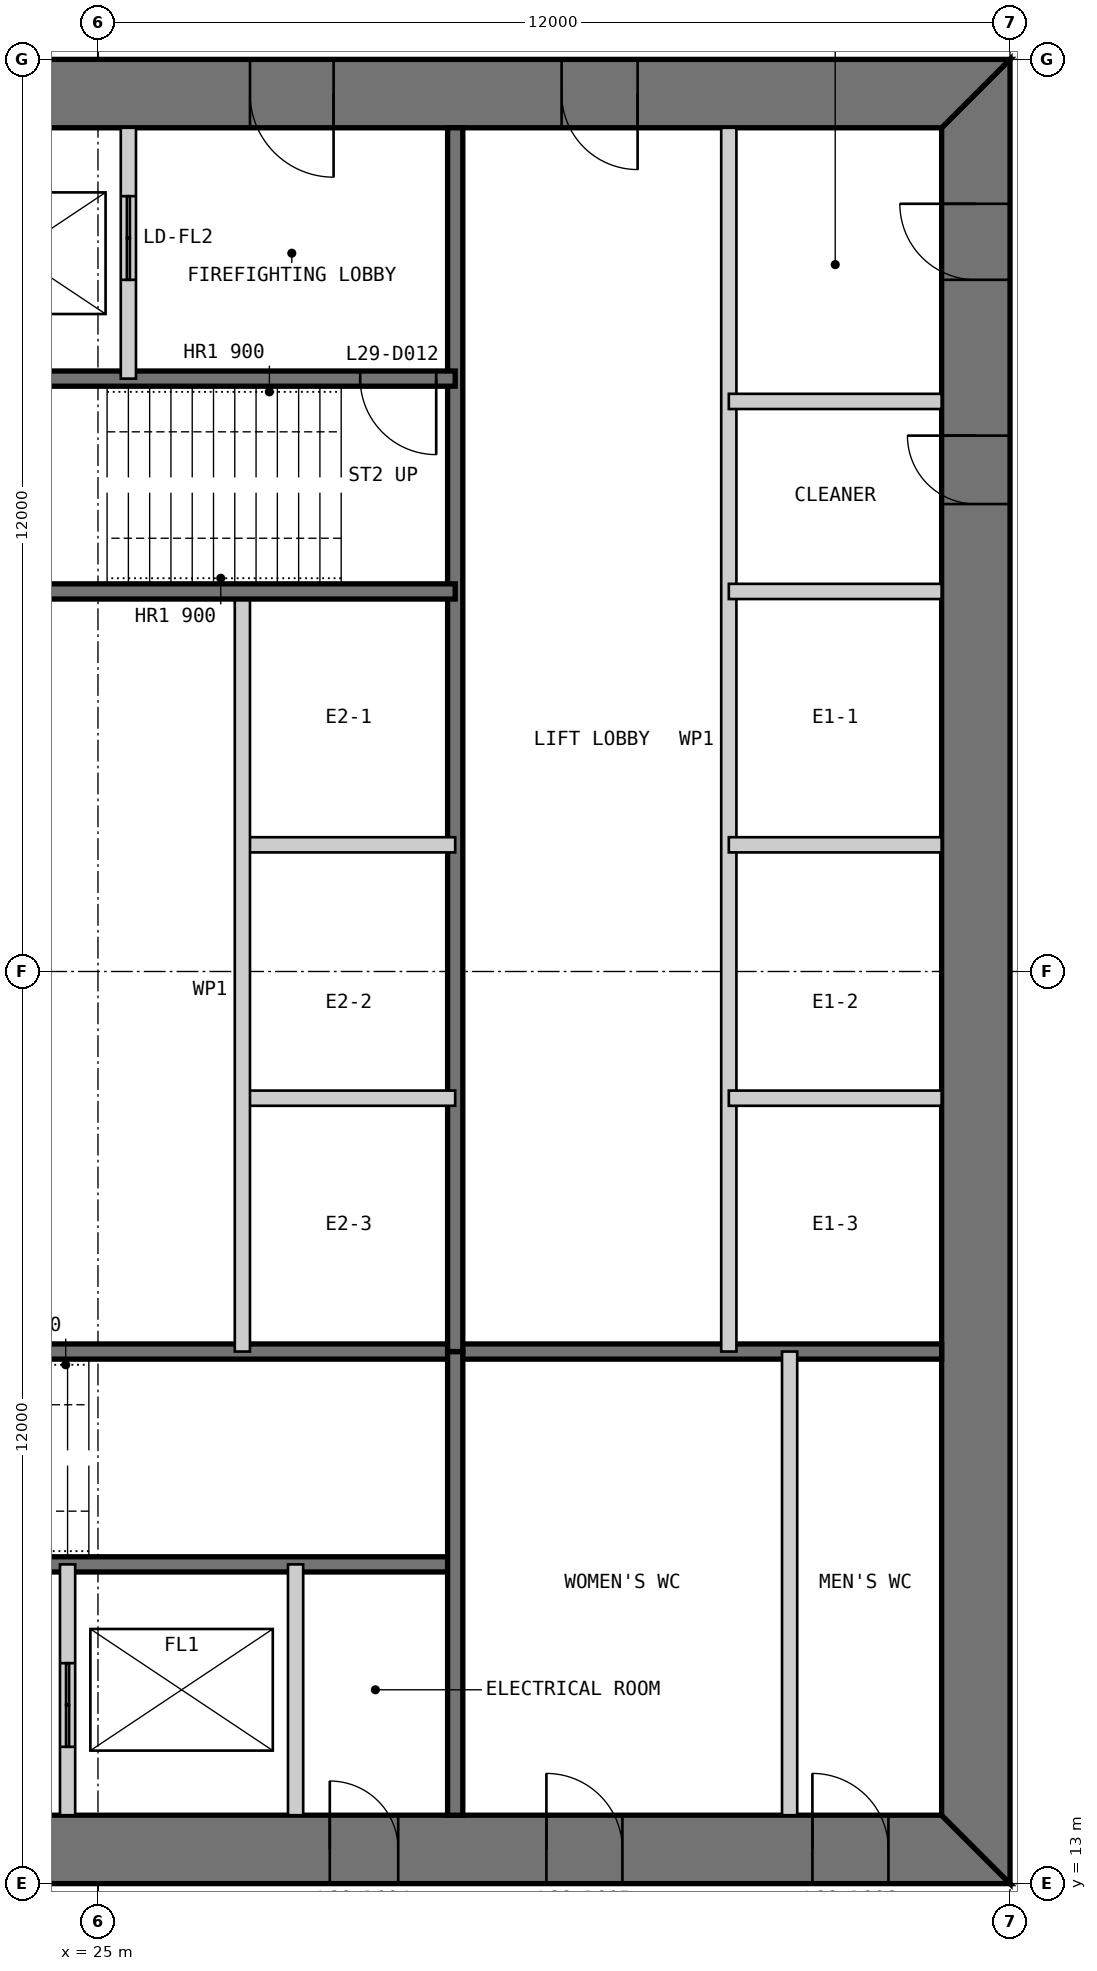
"""IFC4 building model, lengths in metres.
Left out: names, types, materials, properties, quantities, classifications, styles, units other than length and angle.
Written with IfcOpenShell. Run it as: python <this file> out.ifc"""

import sys

from ifc_helpers import new_model, si_unit, direction, frame, frame_2d, origin, place, context, subcontext, project, spatial, polyline, rectangle, outline, extrude, element, fill, save


model = new_model("IFC4")
c1 = context("Model", 3, precision=1e-05, world=origin(), true_north=direction((0.0, 1.0)))
c2 = subcontext(c1, "Body", "Model", "MODEL_VIEW")
j1 = project(units=[si_unit("LENGTHUNIT", "METRE"), si_unit("PLANEANGLEUNIT", "RADIAN")], contexts=[c1])
p1 = place(None, origin())
s1 = spatial("IfcSite", under=j1, at=p1, CompositionType="ELEMENT")
p2 = place(p1, origin())
s2 = spatial("IfcBuilding", under=s1, at=p2, CompositionType="ELEMENT")
p3 = place(p2, frame((0.0, 0.0, 126.4)))
s3 = spatial("IfcBuildingStorey", under=s2, at=p3, CompositionType="ELEMENT", Elevation=126.4)
p4 = place(p3, frame((13.0, 13.45, 0.0), z_axis=(0.0, 0.0, 1.0), x_axis=(1.0, 0.0, 0.0)))
e1 = element("IfcWall", 1, at=p4, inside=s3, PredefinedType="SHEAR", context=c2, shape_type="SweptSolid", body=[
    extrude(outline(polyline([(0.0, -0.45), (24.0, -0.45), (23.1, 0.45), (0.9, 0.45), (0.0, -0.45)])), origin(), (0.0, 0.0, 1.0), 4.0),
])
p5 = place(p4, frame((4.9, 0.0, 0.0)))
e2 = element("IfcOpeningElement", 2, at=p5, cuts=e1, PredefinedType="OPENING", context=c2, shape_type="SweptSolid", body=[
    extrude(rectangle(XDim=1.0, YDim=2.2, at=frame_2d((0.5, 1.1))), frame((0.0, 0.46, 0.0), z_axis=(0.0, -1.0, 0.0), x_axis=(1.0, 0.0, 0.0)), (0.0, 0.0, 1.0), 0.92),
])
p6 = place(p4, frame((8.9, 0.0, 0.0)))
e3 = element("IfcOpeningElement", 3, at=p6, cuts=e1, PredefinedType="OPENING", context=c2, shape_type="SweptSolid", body=[
    extrude(rectangle(XDim=1.1, YDim=2.2, at=frame_2d((0.55, 1.1))), frame((0.0, 0.46, 0.0), z_axis=(0.0, -1.0, 0.0), x_axis=(1.0, 0.0, 0.0)), (0.0, 0.0, 1.0), 0.92),
])
p7 = place(p4, frame((15.05, 0.0, 0.0)))
e4 = element("IfcOpeningElement", 4, at=p7, cuts=e1, PredefinedType="OPENING", context=c2, shape_type="SweptSolid", body=[
    extrude(rectangle(XDim=0.9, YDim=2.2, at=frame_2d((0.45, 1.1))), frame((0.0, 0.46, 0.0), z_axis=(0.0, -1.0, 0.0), x_axis=(1.0, 0.0, 0.0)), (0.0, 0.0, 1.0), 0.92),
])
p8 = place(p4, frame((17.9, 0.0, 0.0)))
e5 = element("IfcOpeningElement", 5, at=p8, cuts=e1, PredefinedType="OPENING", context=c2, shape_type="SweptSolid", body=[
    extrude(rectangle(XDim=1.0, YDim=2.2, at=frame_2d((0.5, 1.1))), frame((0.0, 0.46, 0.0), z_axis=(0.0, -1.0, 0.0), x_axis=(1.0, 0.0, 0.0)), (0.0, 0.0, 1.0), 0.92),
])
p9 = place(p4, frame((21.4, 0.0, 0.0)))
e6 = element("IfcOpeningElement", 6, at=p9, cuts=e1, PredefinedType="OPENING", context=c2, shape_type="SweptSolid", body=[
    extrude(rectangle(XDim=1.0, YDim=2.2, at=frame_2d((0.5, 1.1))), frame((0.0, 0.46, 0.0), z_axis=(0.0, -1.0, 0.0), x_axis=(1.0, 0.0, 0.0)), (0.0, 0.0, 1.0), 0.92),
])
p10 = place(p3, frame((36.55, 13.9, 0.0), z_axis=(0.0, 0.0, 1.0), x_axis=(0.0, 1.0, 0.0)))
e7 = element("IfcWall", 7, at=p10, inside=s3, PredefinedType="SHEAR", context=c2, shape_type="SweptSolid", body=[
    extrude(outline(polyline([(-0.9, -0.45), (23.1, -0.45), (22.2, 0.45), (0.0, 0.45), (-0.9, -0.45)])), origin(), (0.0, 0.0, 1.0), 4.0),
])
p11 = place(p10, frame((20.2, 0.0, 0.0)))
e8 = element("IfcOpeningElement", 8, at=p11, cuts=e7, PredefinedType="OPENING", context=c2, shape_type="SweptSolid", body=[
    extrude(rectangle(XDim=1.0, YDim=2.2, at=frame_2d((0.5, 1.1))), frame((0.0, 0.46, 0.0), z_axis=(0.0, -1.0, 0.0), x_axis=(1.0, 0.0, 0.0)), (0.0, 0.0, 1.0), 0.92),
])
p12 = place(p10, frame((17.25, 0.0, 0.0)))
e9 = element("IfcOpeningElement", 9, at=p12, cuts=e7, PredefinedType="OPENING", context=c2, shape_type="SweptSolid", body=[
    extrude(rectangle(XDim=0.9, YDim=2.2, at=frame_2d((0.45, 1.1))), frame((0.0, 0.46, 0.0), z_axis=(0.0, -1.0, 0.0), x_axis=(1.0, 0.0, 0.0)), (0.0, 0.0, 1.0), 0.92),
])
p13 = place(p3, frame((37.0, 36.55, 0.0), z_axis=(0.0, 0.0, 1.0), x_axis=(-1.0, 0.0, 0.0)))
e10 = element("IfcWall", 10, at=p13, inside=s3, PredefinedType="SHEAR", context=c2, shape_type="SweptSolid", body=[
    extrude(outline(polyline([(0.0, -0.45), (24.0, -0.45), (23.1, 0.45), (0.9, 0.45), (0.0, -0.45)])), origin(), (0.0, 0.0, 1.0), 4.0),
])
p14 = place(p13, frame((4.9, 0.0, 0.0)))
e11 = element("IfcOpeningElement", 11, at=p14, cuts=e10, PredefinedType="OPENING", context=c2, shape_type="SweptSolid", body=[
    extrude(rectangle(XDim=1.0, YDim=2.2, at=frame_2d((0.5, 1.1))), frame((0.0, 0.46, 0.0), z_axis=(0.0, -1.0, 0.0), x_axis=(1.0, 0.0, 0.0)), (0.0, 0.0, 1.0), 0.92),
])
p15 = place(p13, frame((8.9, 0.0, 0.0)))
e12 = element("IfcOpeningElement", 12, at=p15, cuts=e10, PredefinedType="OPENING", context=c2, shape_type="SweptSolid", body=[
    extrude(rectangle(XDim=1.1, YDim=2.2, at=frame_2d((0.55, 1.1))), frame((0.0, 0.46, 0.0), z_axis=(0.0, -1.0, 0.0), x_axis=(1.0, 0.0, 0.0)), (0.0, 0.0, 1.0), 0.92),
])
p16 = place(p13, frame((15.05, 0.0, 0.0)))
e13 = element("IfcOpeningElement", 13, at=p16, cuts=e10, PredefinedType="OPENING", context=c2, shape_type="SweptSolid", body=[
    extrude(rectangle(XDim=0.9, YDim=2.2, at=frame_2d((0.45, 1.1))), frame((0.0, 0.46, 0.0), z_axis=(0.0, -1.0, 0.0), x_axis=(1.0, 0.0, 0.0)), (0.0, 0.0, 1.0), 0.92),
])
p17 = place(p13, frame((17.9, 0.0, 0.0)))
e14 = element("IfcOpeningElement", 14, at=p17, cuts=e10, PredefinedType="OPENING", context=c2, shape_type="SweptSolid", body=[
    extrude(rectangle(XDim=1.0, YDim=2.2, at=frame_2d((0.5, 1.1))), frame((0.0, 0.46, 0.0), z_axis=(0.0, -1.0, 0.0), x_axis=(1.0, 0.0, 0.0)), (0.0, 0.0, 1.0), 0.92),
])
p18 = place(p13, frame((21.4, 0.0, 0.0)))
e15 = element("IfcOpeningElement", 15, at=p18, cuts=e10, PredefinedType="OPENING", context=c2, shape_type="SweptSolid", body=[
    extrude(rectangle(XDim=1.0, YDim=2.2, at=frame_2d((0.5, 1.1))), frame((0.0, 0.46, 0.0), z_axis=(0.0, -1.0, 0.0), x_axis=(1.0, 0.0, 0.0)), (0.0, 0.0, 1.0), 0.92),
])
p19 = place(p3, frame((20.3, 17.2, 0.0), z_axis=(0.0, 0.0, 1.0), x_axis=(1.0, 0.0, 0.0)))
e16 = element("IfcWall", 16, at=p19, inside=s3, PredefinedType="SOLIDWALL", context=c2, shape_type="SweptSolid", body=[
    extrude(rectangle(XDim=9.4, YDim=0.2, at=frame_2d((4.7, 0.0))), origin(), (0.0, 0.0, 1.0), 3.8),
])
p20 = place(p19, frame((0.25, 0.0, 0.0)))
e17 = element("IfcOpeningElement", 17, at=p20, cuts=e16, PredefinedType="OPENING", context=c2, shape_type="SweptSolid", body=[
    extrude(rectangle(XDim=1.0, YDim=2.2, at=frame_2d((0.5, 1.1))), frame((0.0, 0.11, 0.0), z_axis=(0.0, -1.0, 0.0), x_axis=(1.0, 0.0, 0.0)), (0.0, 0.0, 1.0), 0.22),
])
p21 = place(p3, frame((20.3, 20.0, 0.0), z_axis=(0.0, 0.0, 1.0), x_axis=(1.0, 0.0, 0.0)))
e18 = element("IfcWall", 18, at=p21, inside=s3, PredefinedType="SOLIDWALL", context=c2, shape_type="SweptSolid", body=[
    extrude(rectangle(XDim=15.8, YDim=0.2, at=frame_2d((7.9, 0.0))), origin(), (0.0, 0.0, 1.0), 3.8),
])
p22 = place(p3, frame((24.6, 13.9, 0.0), z_axis=(0.0, 0.0, 1.0), x_axis=(0.0, 1.0, 0.0)))
e19 = element("IfcWall", 19, at=p22, inside=s3, PredefinedType="PARTITIONING", context=c2, shape_type="SweptSolid", body=[
    extrude(rectangle(XDim=3.3, YDim=0.2, at=frame_2d((1.65, 0.0))), origin(), (0.0, 0.0, 1.0), 3.8),
])
p23 = place(p22, frame((0.9, 0.0, 0.0)))
e20 = element("IfcOpeningElement", 20, at=p23, cuts=e19, PredefinedType="OPENING", context=c2, shape_type="SweptSolid", body=[
    extrude(rectangle(XDim=1.1, YDim=2.2, at=frame_2d((0.55, 1.1))), frame((0.0, 0.11, 0.0), z_axis=(0.0, -1.0, 0.0), x_axis=(1.0, 0.0, 0.0)), (0.0, 0.0, 1.0), 0.22),
])
p24 = place(p3, frame((27.6, 13.9, 0.0), z_axis=(0.0, 0.0, 1.0), x_axis=(0.0, 1.0, 0.0)))
e21 = element("IfcWall", 21, at=p24, inside=s3, PredefinedType="PARTITIONING", context=c2, shape_type="SweptSolid", body=[
    extrude(rectangle(XDim=3.3, YDim=0.2, at=frame_2d((1.65, 0.0))), origin(), (0.0, 0.0, 1.0), 3.8),
])
p25 = place(p3, frame((29.7, 13.9, 0.0), z_axis=(0.0, 0.0, 1.0), x_axis=(0.0, 1.0, 0.0)))
e22 = element("IfcWall", 22, at=p25, inside=s3, PredefinedType="SOLIDWALL", context=c2, shape_type="SweptSolid", body=[
    extrude(rectangle(XDim=6.1, YDim=0.2, at=frame_2d((3.05, 0.0))), origin(), (0.0, 0.0, 1.0), 3.8),
])
p26 = place(p3, frame((34.1, 13.9, 0.0), z_axis=(0.0, 0.0, 1.0), x_axis=(0.0, 1.0, 0.0)))
e23 = element("IfcWall", 23, at=p26, inside=s3, PredefinedType="PARTITIONING", context=c2, shape_type="SweptSolid", body=[
    extrude(rectangle(XDim=6.1, YDim=0.2, at=frame_2d((3.05, 0.0))), origin(), (0.0, 0.0, 1.0), 3.8),
])
p27 = place(p3, frame((33.3, 36.1, 0.0), z_axis=(0.0, 0.0, 1.0), x_axis=(0.0, -1.0, 0.0)))
e24 = element("IfcWall", 24, at=p27, inside=s3, PredefinedType="PARTITIONING", context=c2, shape_type="SweptSolid", body=[
    extrude(rectangle(XDim=16.1, YDim=0.2, at=frame_2d((8.05, 0.0))), origin(), (0.0, 0.0, 1.0), 3.8),
])
p28 = place(p3, frame((29.7, 36.1, 0.0), z_axis=(0.0, 0.0, 1.0), x_axis=(0.0, -1.0, 0.0)))
e25 = element("IfcWall", 25, at=p28, inside=s3, PredefinedType="SOLIDWALL", context=c2, shape_type="SweptSolid", body=[
    extrude(rectangle(XDim=16.1, YDim=0.2, at=frame_2d((8.05, 0.0))), origin(), (0.0, 0.0, 1.0), 3.8),
])
for number, where, z_axis, x_axis in (
    (26, (36.1, 30.0, 0.0), (0.0, 0.0, 1.0), (-1.0, 0.0, 0.0)),
    (27, (36.1, 26.667, 0.0), (0.0, 0.0, 1.0), (-1.0, 0.0, 0.0)),
    (28, (36.1, 23.333, 0.0), (0.0, 0.0, 1.0), (-1.0, 0.0, 0.0)),
    (29, (29.7, 26.667, 0.0), (0.0, 0.0, 1.0), (-1.0, 0.0, 0.0)),
    (30, (29.7, 23.333, 0.0), (0.0, 0.0, 1.0), (-1.0, 0.0, 0.0)),
):
    element("IfcWall", number, at=place(p3, frame(where, z_axis=z_axis, x_axis=x_axis)), inside=s3, PredefinedType="PARTITIONING", context=c2, shape_type="SweptSolid", body=[
        extrude(rectangle(XDim=2.8, YDim=0.2, at=frame_2d((1.4, 0.0))), origin(), (0.0, 0.0, 1.0), 3.8),
    ])
p29 = place(p3, frame((26.9, 30.0, 0.0), z_axis=(0.0, 0.0, 1.0), x_axis=(0.0, -1.0, 0.0)))
e31 = element("IfcWall", 31, at=p29, inside=s3, PredefinedType="PARTITIONING", context=c2, shape_type="SweptSolid", body=[
    extrude(rectangle(XDim=10.0, YDim=0.2, at=frame_2d((5.0, 0.0))), origin(), (0.0, 0.0, 1.0), 3.8),
])
p30 = place(p3, frame((29.7, 32.8, 0.0), z_axis=(0.0, 0.0, 1.0), x_axis=(-1.0, 0.0, 0.0)))
e32 = element("IfcWall", 32, at=p30, inside=s3, PredefinedType="SOLIDWALL", context=c2, shape_type="SweptSolid", body=[
    extrude(rectangle(XDim=9.4, YDim=0.2, at=frame_2d((4.7, 0.0))), origin(), (0.0, 0.0, 1.0), 3.8),
])
p31 = place(p30, frame((0.25, 0.0, 0.0)))
e33 = element("IfcOpeningElement", 33, at=p31, cuts=e32, PredefinedType="OPENING", context=c2, shape_type="SweptSolid", body=[
    extrude(rectangle(XDim=1.0, YDim=2.2, at=frame_2d((0.5, 1.1))), frame((0.0, 0.11, 0.0), z_axis=(0.0, -1.0, 0.0), x_axis=(1.0, 0.0, 0.0)), (0.0, 0.0, 1.0), 0.22),
])
p32 = place(p3, frame((29.7, 30.0, 0.0), z_axis=(0.0, 0.0, 1.0), x_axis=(-1.0, 0.0, 0.0)))
e34 = element("IfcWall", 34, at=p32, inside=s3, PredefinedType="SOLIDWALL", context=c2, shape_type="SweptSolid", body=[
    extrude(rectangle(XDim=15.8, YDim=0.2, at=frame_2d((7.9, 0.0))), origin(), (0.0, 0.0, 1.0), 3.8),
])
p33 = place(p3, frame((25.4, 36.1, 0.0), z_axis=(0.0, 0.0, 1.0), x_axis=(0.0, -1.0, 0.0)))
e35 = element("IfcWall", 35, at=p33, inside=s3, PredefinedType="PARTITIONING", context=c2, shape_type="SweptSolid", body=[
    extrude(rectangle(XDim=3.3, YDim=0.2, at=frame_2d((1.65, 0.0))), origin(), (0.0, 0.0, 1.0), 3.8),
])
p34 = place(p33, frame((0.9, 0.0, 0.0)))
e36 = element("IfcOpeningElement", 36, at=p34, cuts=e35, PredefinedType="OPENING", context=c2, shape_type="SweptSolid", body=[
    extrude(rectangle(XDim=1.1, YDim=2.2, at=frame_2d((0.55, 1.1))), frame((0.0, 0.11, 0.0), z_axis=(0.0, -1.0, 0.0), x_axis=(1.0, 0.0, 0.0)), (0.0, 0.0, 1.0), 0.22),
])
p35 = place(p3, frame((36.1, 32.5, 0.0), z_axis=(0.0, 0.0, 1.0), x_axis=(-1.0, 0.0, 0.0)))
e37 = element("IfcWall", 37, at=p35, inside=s3, PredefinedType="PARTITIONING", context=c2, shape_type="SweptSolid", body=[
    extrude(rectangle(XDim=2.8, YDim=0.2, at=frame_2d((1.4, 0.0))), origin(), (0.0, 0.0, 1.0), 3.8),
])
p36 = place(p7, origin())
e38 = element("IfcDoor", 38, at=p36, inside=s3, OperationType="SINGLE_SWING_LEFT", PredefinedType="DOOR", context=c2, shape_type="SweptSolid", body=[
    extrude(rectangle(XDim=0.9, YDim=2.2, at=frame_2d((0.45, 1.1))), frame((0.0, 0.025, 0.0), z_axis=(0.0, -1.0, 0.0), x_axis=(1.0, 0.0, 0.0)), (0.0, 0.0, 1.0), 0.05),
    extrude(outline(polyline([(0.0, 0.0), (0.04, 0.0), (0.04, 2.16), (0.86, 2.16), (0.86, 0.0), (0.9, 0.0), (0.9, 2.2), (0.0, 2.2), (0.0, 0.0)])), frame((0.0, 0.3, 0.0), z_axis=(0.0, -1.0, 0.0), x_axis=(1.0, 0.0, 0.0)), (0.0, 0.0, 1.0), 0.6),
])
fill(e4, e38)
p37 = place(p8, origin())
e39 = element("IfcDoor", 39, at=p37, inside=s3, OperationType="SINGLE_SWING_LEFT", PredefinedType="DOOR", context=c2, shape_type="SweptSolid", body=[
    extrude(rectangle(XDim=1.0, YDim=2.2, at=frame_2d((0.5, 1.1))), frame((0.0, 0.025, 0.0), z_axis=(0.0, -1.0, 0.0), x_axis=(1.0, 0.0, 0.0)), (0.0, 0.0, 1.0), 0.05),
    extrude(outline(polyline([(0.0, 0.0), (0.04, 0.0), (0.04, 2.16), (0.96, 2.16), (0.96, 0.0), (1.0, 0.0), (1.0, 2.2), (0.0, 2.2), (0.0, 0.0)])), frame((0.0, 0.3, 0.0), z_axis=(0.0, -1.0, 0.0), x_axis=(1.0, 0.0, 0.0)), (0.0, 0.0, 1.0), 0.6),
])
fill(e5, e39)
p38 = place(p9, origin())
e40 = element("IfcDoor", 40, at=p38, inside=s3, OperationType="SINGLE_SWING_LEFT", PredefinedType="DOOR", context=c2, shape_type="SweptSolid", body=[
    extrude(rectangle(XDim=1.0, YDim=2.2, at=frame_2d((0.5, 1.1))), frame((0.0, 0.025, 0.0), z_axis=(0.0, -1.0, 0.0), x_axis=(1.0, 0.0, 0.0)), (0.0, 0.0, 1.0), 0.05),
    extrude(outline(polyline([(0.0, 0.0), (0.04, 0.0), (0.04, 2.16), (0.96, 2.16), (0.96, 0.0), (1.0, 0.0), (1.0, 2.2), (0.0, 2.2), (0.0, 0.0)])), frame((0.0, 0.3, 0.0), z_axis=(0.0, -1.0, 0.0), x_axis=(1.0, 0.0, 0.0)), (0.0, 0.0, 1.0), 0.6),
])
fill(e6, e40)
p39 = place(p14, origin())
e41 = element("IfcDoor", 41, at=p39, inside=s3, OperationType="SINGLE_SWING_LEFT", PredefinedType="DOOR", context=c2, shape_type="SweptSolid", body=[
    extrude(rectangle(XDim=1.0, YDim=2.2, at=frame_2d((0.5, 1.1))), frame((0.0, 0.025, 0.0), z_axis=(0.0, -1.0, 0.0), x_axis=(1.0, 0.0, 0.0)), (0.0, 0.0, 1.0), 0.05),
    extrude(outline(polyline([(0.0, 0.0), (0.04, 0.0), (0.04, 2.16), (0.96, 2.16), (0.96, 0.0), (1.0, 0.0), (1.0, 2.2), (0.0, 2.2), (0.0, 0.0)])), frame((0.0, 0.3, 0.0), z_axis=(0.0, -1.0, 0.0), x_axis=(1.0, 0.0, 0.0)), (0.0, 0.0, 1.0), 0.6),
])
fill(e11, e41)
p40 = place(p15, origin())
e42 = element("IfcDoor", 42, at=p40, inside=s3, OperationType="SINGLE_SWING_LEFT", PredefinedType="DOOR", context=c2, shape_type="SweptSolid", body=[
    extrude(rectangle(XDim=1.1, YDim=2.2, at=frame_2d((0.55, 1.1))), frame((0.0, 0.025, 0.0), z_axis=(0.0, -1.0, 0.0), x_axis=(1.0, 0.0, 0.0)), (0.0, 0.0, 1.0), 0.05),
    extrude(outline(polyline([(0.0, 0.0), (0.04, 0.0), (0.04, 2.16), (1.06, 2.16), (1.06, 0.0), (1.1, 0.0), (1.1, 2.2), (0.0, 2.2), (0.0, 0.0)])), frame((0.0, 0.3, 0.0), z_axis=(0.0, -1.0, 0.0), x_axis=(1.0, 0.0, 0.0)), (0.0, 0.0, 1.0), 0.6),
])
fill(e12, e42)
p41 = place(p31, origin())
e43 = element("IfcDoor", 43, at=p41, inside=s3, OperationType="SINGLE_SWING_LEFT", PredefinedType="DOOR", context=c2, shape_type="SweptSolid", body=[
    extrude(rectangle(XDim=1.0, YDim=2.2, at=frame_2d((0.5, 1.1))), frame((0.0, 0.025, 0.0), z_axis=(0.0, -1.0, 0.0), x_axis=(1.0, 0.0, 0.0)), (0.0, 0.0, 1.0), 0.05),
])
fill(e33, e43)
p42 = place(p11, origin())
e44 = element("IfcDoor", 44, at=p42, inside=s3, OperationType="SINGLE_SWING_RIGHT", PredefinedType="DOOR", context=c2, shape_type="SweptSolid", body=[
    extrude(rectangle(XDim=1.0, YDim=2.2, at=frame_2d((0.5, 1.1))), frame((0.0, 0.025, 0.0), z_axis=(0.0, -1.0, 0.0), x_axis=(1.0, 0.0, 0.0)), (0.0, 0.0, 1.0), 0.05),
    extrude(outline(polyline([(0.0, 0.0), (0.04, 0.0), (0.04, 2.16), (0.96, 2.16), (0.96, 0.0), (1.0, 0.0), (1.0, 2.2), (0.0, 2.2), (0.0, 0.0)])), frame((0.0, 0.3, 0.0), z_axis=(0.0, -1.0, 0.0), x_axis=(1.0, 0.0, 0.0)), (0.0, 0.0, 1.0), 0.6),
])
fill(e8, e44)
p43 = place(p12, origin())
e45 = element("IfcDoor", 45, at=p43, inside=s3, OperationType="SINGLE_SWING_RIGHT", PredefinedType="DOOR", context=c2, shape_type="SweptSolid", body=[
    extrude(rectangle(XDim=0.9, YDim=2.2, at=frame_2d((0.45, 1.1))), frame((0.0, 0.025, 0.0), z_axis=(0.0, -1.0, 0.0), x_axis=(1.0, 0.0, 0.0)), (0.0, 0.0, 1.0), 0.05),
    extrude(outline(polyline([(0.0, 0.0), (0.04, 0.0), (0.04, 2.16), (0.86, 2.16), (0.86, 0.0), (0.9, 0.0), (0.9, 2.2), (0.0, 2.2), (0.0, 0.0)])), frame((0.0, 0.3, 0.0), z_axis=(0.0, -1.0, 0.0), x_axis=(1.0, 0.0, 0.0)), (0.0, 0.0, 1.0), 0.6),
])
fill(e9, e45)
p44 = place(p23, origin())
e46 = element("IfcDoor", 46, at=p44, inside=s3, OperationType="DOUBLE_DOOR_SLIDING", PredefinedType="DOOR", context=c2, shape_type="SweptSolid", body=[
    extrude(rectangle(XDim=1.1, YDim=2.2, at=frame_2d((0.55, 1.1))), frame((0.0, 0.025, 0.0), z_axis=(0.0, -1.0, 0.0), x_axis=(1.0, 0.0, 0.0)), (0.0, 0.0, 1.0), 0.05),
])
fill(e20, e46)
p45 = place(p34, origin())
e47 = element("IfcDoor", 47, at=p45, inside=s3, OperationType="DOUBLE_DOOR_SLIDING", PredefinedType="DOOR", context=c2, shape_type="SweptSolid", body=[
    extrude(rectangle(XDim=1.1, YDim=2.2, at=frame_2d((0.55, 1.1))), frame((0.0, 0.025, 0.0), z_axis=(0.0, -1.0, 0.0), x_axis=(1.0, 0.0, 0.0)), (0.0, 0.0, 1.0), 0.05),
])
fill(e36, e47)
save(model, sys.argv[1])
